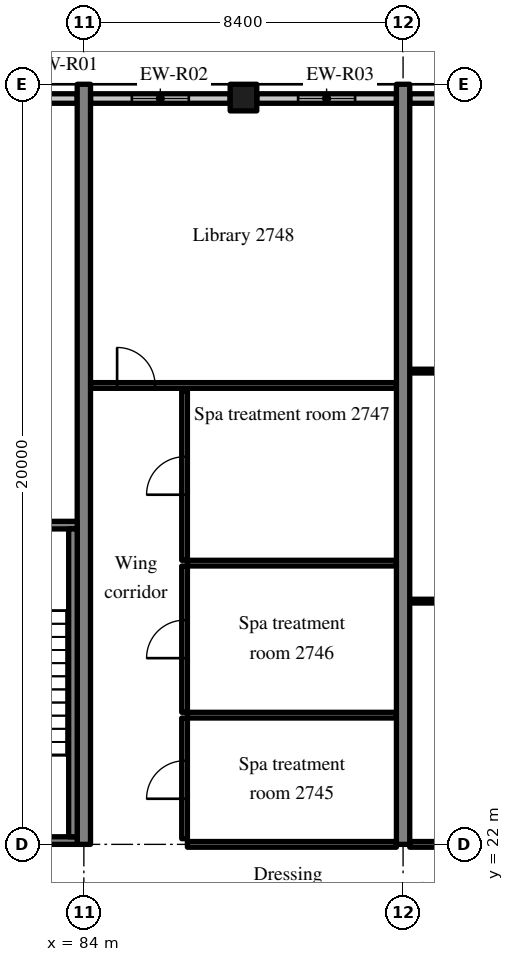
"""IFC4 building model, lengths in metres.
Left out: names, types, materials, properties, quantities, classifications, styles, units other than length and angle.
Written with IfcOpenShell. Run it as: python <this file> out.ifc"""

import sys

from ifc_helpers import new_model, si_unit, direction, frame, frame_2d, origin, origin_2d, place, context, subcontext, project, spatial, rectangle, extrude, source, transform, mapped, element, fill, save


model = new_model("IFC4")
c1 = context("Model", 3, precision=1e-05, world=origin(), true_north=direction((0.0, 1.0)))
c2 = subcontext(c1, "Body", "Model", "MODEL_VIEW")
j1 = project(units=[si_unit("LENGTHUNIT", "METRE"), si_unit("PLANEANGLEUNIT", "RADIAN")], contexts=[c1])
p1 = place(None, origin())
s1 = spatial("IfcSite", under=j1, at=p1, CompositionType="ELEMENT")
p2 = place(p1, origin())
s2 = spatial("IfcBuilding", under=s1, at=p2, CompositionType="ELEMENT")
p3 = place(p2, frame((0.0, 0.0, 114.2)))
s3 = spatial("IfcBuildingStorey", under=s2, at=p3, CompositionType="ELEMENT", Elevation=114.2)
m1 = source(origin(), c2, "Body", "SweptSolid", [
    extrude(rectangle(XDim=20.0, YDim=0.35, at=frame_2d((10.0, 0.0))), origin(), (0.0, 0.0, 1.0), 3.52),
])
for number, where, z_axis, x_axis in (
    (1, (84.0, 22.0, 0.0), (0.0, 0.0, 1.0), (0.0, 1.0, 0.0)),
    (2, (92.4, 22.0, 0.0), (0.0, 0.0, 1.0), (0.0, 1.0, 0.0)),
):
    element("IfcWall", number, at=place(p3, frame(where, z_axis=z_axis, x_axis=x_axis)), inside=s3, PredefinedType="SHEAR", context=c2, shape_type="MappedRepresentation", body=[
        mapped(m1, transform((0.0, 0.0, 0.0), scale=1.0)),
    ])
m2 = source(origin(), c2, "Body", "SweptSolid", [
    extrude(rectangle(XDim=0.7, YDim=0.7, at=origin_2d()), origin(), (0.0, 0.0, 1.0), 3.52),
])
p4 = place(p3, frame((88.2, 41.65, 0.0), z_axis=(0.0, 0.0, 1.0), x_axis=(1.0, 0.0, 0.0)))
e3 = element("IfcColumn", 3, at=p4, inside=s3, PredefinedType="COLUMN", context=c2, shape_type="MappedRepresentation", body=[
    mapped(m2, transform((0.0, 0.0, 0.0), scale=1.0)),
])
m3 = source(origin(), c2, "Body", "SweptSolid", [
    extrude(rectangle(XDim=1.683, YDim=0.25, at=frame_2d((0.841, 0.0))), origin(), (0.0, 0.0, 1.0), 2.82),
])
p5 = place(p3, frame((83.825, 41.625, 0.0), z_axis=(0.0, 0.0, 1.0), x_axis=(-1.0, 0.0, 0.0)))
e4 = element("IfcWall", 4, at=p5, inside=s3, PredefinedType="SOLIDWALL", context=c2, shape_type="MappedRepresentation", body=[
    mapped(m3, transform((0.0, 0.0, 0.0), scale=1.0)),
])
m4 = source(origin(), c2, "Body", "SweptSolid", [
    extrude(rectangle(XDim=3.675, YDim=0.25, at=frame_2d((1.837, 0.0))), origin(), (0.0, 0.0, 1.0), 2.82),
])
p6 = place(p3, frame((87.85, 41.625, 0.0), z_axis=(0.0, 0.0, 1.0), x_axis=(-1.0, 0.0, 0.0)))
e5 = element("IfcWall", 5, at=p6, inside=s3, PredefinedType="SOLIDWALL", context=c2, shape_type="MappedRepresentation", body=[
    mapped(m4, transform((0.0, 0.0, 0.0), scale=1.0)),
])
m5 = source(origin(), c2, "Body", "SweptSolid", [
    extrude(rectangle(XDim=1.5, YDim=1.5, at=frame_2d((0.75, 0.75))), frame((0.0, 0.135, 0.0), z_axis=(0.0, -1.0, 0.0), x_axis=(1.0, 0.0, 0.0)), (0.0, 0.0, 1.0), 0.27),
])
p7 = place(p6, frame((1.087, 0.0, 0.9)))
e6 = element("IfcOpeningElement", 6, at=p7, cuts=e5, PredefinedType="OPENING", context=c2, shape_type="MappedRepresentation", body=[
    mapped(m5, transform((0.0, 0.0, 0.0), scale=1.0)),
])
p8 = place(p3, frame((92.225, 41.625, 0.0), z_axis=(0.0, 0.0, 1.0), x_axis=(-1.0, 0.0, 0.0)))
e7 = element("IfcWall", 7, at=p8, inside=s3, PredefinedType="SOLIDWALL", context=c2, shape_type="MappedRepresentation", body=[
    mapped(m4, transform((0.0, 0.0, 0.0), scale=1.0)),
])
p9 = place(p8, frame((1.087, 0.0, 0.9)))
e8 = element("IfcOpeningElement", 8, at=p9, cuts=e7, PredefinedType="OPENING", context=c2, shape_type="MappedRepresentation", body=[
    mapped(m5, transform((0.0, 0.0, 0.0), scale=1.0)),
])
m6 = source(origin(), c2, "Body", "SweptSolid", [
    extrude(rectangle(XDim=4.07, YDim=0.25, at=frame_2d((2.035, 0.0))), origin(), (0.0, 0.0, 1.0), 2.82),
])
p10 = place(p3, frame((96.645, 41.625, 0.0), z_axis=(0.0, 0.0, 1.0), x_axis=(-1.0, 0.0, 0.0)))
e9 = element("IfcWall", 9, at=p10, inside=s3, PredefinedType="SOLIDWALL", context=c2, shape_type="MappedRepresentation", body=[
    mapped(m6, transform((0.0, 0.0, 0.0), scale=1.0)),
])
p11 = place(p10, frame((1.285, 0.0, 0.9)))
e10 = element("IfcOpeningElement", 10, at=p11, cuts=e9, PredefinedType="OPENING", context=c2, shape_type="MappedRepresentation", body=[
    mapped(m5, transform((0.0, 0.0, 0.0), scale=1.0)),
])
m7 = source(origin(), c2, "Body", "SweptSolid", [
    extrude(rectangle(XDim=8.225, YDim=0.2, at=frame_2d((4.112, 0.0))), origin(), (0.0, 0.0, 1.0), 3.52),
])
p12 = place(p3, frame((83.825, 22.1, 0.0), z_axis=(0.0, 0.0, 1.0), x_axis=(-1.0, 0.0, 0.0)))
e11 = element("IfcWall", 11, at=p12, inside=s3, PredefinedType="SOLIDWALL", context=c2, shape_type="MappedRepresentation", body=[
    mapped(m7, transform((0.0, 0.0, 0.0), scale=1.0)),
])
m8 = source(origin(), c2, "Body", "SweptSolid", [
    extrude(rectangle(XDim=1.2, YDim=2.1, at=frame_2d((0.6, 1.05))), frame((0.0, 0.11, 0.0), z_axis=(0.0, -1.0, 0.0), x_axis=(1.0, 0.0, 0.0)), (0.0, 0.0, 1.0), 0.22),
])
p13 = place(p12, frame((6.025, 0.0, 0.0)))
e12 = element("IfcOpeningElement", 12, at=p13, cuts=e11, PredefinedType="OPENING", context=c2, shape_type="MappedRepresentation", body=[
    mapped(m8, transform((0.0, 0.0, 0.0), scale=1.0)),
])
p14 = place(p3, frame((83.825, 30.4, 0.0), z_axis=(0.0, 0.0, 1.0), x_axis=(-1.0, 0.0, 0.0)))
e13 = element("IfcWall", 13, at=p14, inside=s3, PredefinedType="SOLIDWALL", context=c2, shape_type="MappedRepresentation", body=[
    mapped(m7, transform((0.0, 0.0, 0.0), scale=1.0)),
])
m9 = source(origin(), c2, "Body", "SweptSolid", [
    extrude(rectangle(XDim=1.0, YDim=2.1, at=frame_2d((0.5, 1.05))), frame((0.0, 0.11, 0.0), z_axis=(0.0, -1.0, 0.0), x_axis=(1.0, 0.0, 0.0)), (0.0, 0.0, 1.0), 0.22),
])
p15 = place(p14, frame((6.125, 0.0, 0.0)))
e14 = element("IfcOpeningElement", 14, at=p15, cuts=e13, PredefinedType="OPENING", context=c2, shape_type="MappedRepresentation", body=[
    mapped(m9, transform((0.0, 0.0, 0.0), scale=1.0)),
])
m10 = source(origin(), c2, "Body", "SweptSolid", [
    extrude(rectangle(XDim=8.1, YDim=0.225, at=frame_2d((4.05, 0.0))), origin(), (0.0, 0.0, 1.0), 3.52),
])
p16 = place(p3, frame((83.713, 22.2, 0.0), z_axis=(0.0, 0.0, 1.0), x_axis=(0.0, 1.0, 0.0)))
e15 = element("IfcWall", 15, at=p16, inside=s3, PredefinedType="SOLIDWALL", context=c2, shape_type="MappedRepresentation", body=[
    mapped(m10, transform((0.0, 0.0, 0.0), scale=1.0)),
])
m11 = source(origin(), c2, "Body", "SweptSolid", [
    extrude(rectangle(XDim=5.5, YDim=0.15, at=frame_2d((2.75, 0.0))), origin(), (0.0, 0.0, 1.0), 2.82),
])
p17 = place(p3, frame((86.725, 22.0, 0.0), z_axis=(0.0, 0.0, 1.0), x_axis=(1.0, 0.0, 0.0)))
e16 = element("IfcWall", 16, at=p17, inside=s3, PredefinedType="PARTITIONING", context=c2, shape_type="MappedRepresentation", body=[
    mapped(m11, transform((0.0, 0.0, 0.0), scale=1.0)),
])
m12 = source(origin(), c2, "Body", "SweptSolid", [
    extrude(rectangle(XDim=3.175, YDim=0.15, at=frame_2d((1.587, 0.0))), origin(), (0.0, 0.0, 1.0), 3.52),
])
p18 = place(p3, frame((86.65, 22.15, 0.0), z_axis=(0.0, 0.0, 1.0), x_axis=(0.0, 1.0, 0.0)))
e17 = element("IfcWall", 17, at=p18, inside=s3, PredefinedType="PARTITIONING", context=c2, shape_type="MappedRepresentation", body=[
    mapped(m12, transform((0.0, 0.0, 0.0), scale=1.0)),
])
m13 = source(origin(), c2, "Body", "SweptSolid", [
    extrude(rectangle(XDim=1.0, YDim=2.1, at=frame_2d((0.5, 1.05))), frame((0.0, 0.085, 0.0), z_axis=(0.0, -1.0, 0.0), x_axis=(1.0, 0.0, 0.0)), (0.0, 0.0, 1.0), 0.17),
])
p19 = place(p18, frame((1.05, 0.0, 0.0)))
e18 = element("IfcOpeningElement", 18, at=p19, cuts=e17, PredefinedType="OPENING", context=c2, shape_type="MappedRepresentation", body=[
    mapped(m13, transform((0.0, 0.0, 0.0), scale=1.0)),
])
m14 = source(origin(), c2, "Body", "SweptSolid", [
    extrude(rectangle(XDim=5.5, YDim=0.15, at=frame_2d((2.75, 0.0))), origin(), (0.0, 0.0, 1.0), 3.52),
])
p20 = place(p3, frame((86.725, 25.4, 0.0), z_axis=(0.0, 0.0, 1.0), x_axis=(1.0, 0.0, 0.0)))
e19 = element("IfcWall", 19, at=p20, inside=s3, PredefinedType="PARTITIONING", context=c2, shape_type="MappedRepresentation", body=[
    mapped(m14, transform((0.0, 0.0, 0.0), scale=1.0)),
])
m15 = source(origin(), c2, "Body", "SweptSolid", [
    extrude(rectangle(XDim=3.85, YDim=0.15, at=frame_2d((1.925, 0.0))), origin(), (0.0, 0.0, 1.0), 3.52),
])
p21 = place(p3, frame((86.65, 25.475, 0.0), z_axis=(0.0, 0.0, 1.0), x_axis=(0.0, 1.0, 0.0)))
e20 = element("IfcWall", 20, at=p21, inside=s3, PredefinedType="PARTITIONING", context=c2, shape_type="MappedRepresentation", body=[
    mapped(m15, transform((0.0, 0.0, 0.0), scale=1.0)),
])
p22 = place(p21, frame((1.425, 0.0, 0.0)))
e21 = element("IfcOpeningElement", 21, at=p22, cuts=e20, PredefinedType="OPENING", context=c2, shape_type="MappedRepresentation", body=[
    mapped(m13, transform((0.0, 0.0, 0.0), scale=1.0)),
])
p23 = place(p3, frame((86.725, 29.4, 0.0), z_axis=(0.0, 0.0, 1.0), x_axis=(1.0, 0.0, 0.0)))
e22 = element("IfcWall", 22, at=p23, inside=s3, PredefinedType="PARTITIONING", context=c2, shape_type="MappedRepresentation", body=[
    mapped(m14, transform((0.0, 0.0, 0.0), scale=1.0)),
])
m16 = source(origin(), c2, "Body", "SweptSolid", [
    extrude(rectangle(XDim=4.45, YDim=0.15, at=frame_2d((2.225, 0.0))), origin(), (0.0, 0.0, 1.0), 3.52),
])
p24 = place(p3, frame((86.65, 29.475, 0.0), z_axis=(0.0, 0.0, 1.0), x_axis=(0.0, 1.0, 0.0)))
e23 = element("IfcWall", 23, at=p24, inside=s3, PredefinedType="PARTITIONING", context=c2, shape_type="MappedRepresentation", body=[
    mapped(m16, transform((0.0, 0.0, 0.0), scale=1.0)),
])
p25 = place(p24, frame((1.725, 0.0, 0.0)))
e24 = element("IfcOpeningElement", 24, at=p25, cuts=e23, PredefinedType="OPENING", context=c2, shape_type="MappedRepresentation", body=[
    mapped(m13, transform((0.0, 0.0, 0.0), scale=1.0)),
])
m17 = source(origin(), c2, "Body", "SweptSolid", [
    extrude(rectangle(XDim=8.05, YDim=0.15, at=frame_2d((4.025, 0.0))), origin(), (0.0, 0.0, 1.0), 3.52),
])
p26 = place(p3, frame((84.175, 34.075, 0.0), z_axis=(0.0, 0.0, 1.0), x_axis=(1.0, 0.0, 0.0)))
e25 = element("IfcWall", 25, at=p26, inside=s3, PredefinedType="PARTITIONING", context=c2, shape_type="MappedRepresentation", body=[
    mapped(m17, transform((0.0, 0.0, 0.0), scale=1.0)),
])
p27 = place(p26, frame((0.7, 0.0, 0.0)))
e26 = element("IfcOpeningElement", 26, at=p27, cuts=e25, PredefinedType="OPENING", context=c2, shape_type="MappedRepresentation", body=[
    mapped(m13, transform((0.0, 0.0, 0.0), scale=1.0)),
])
m18 = source(origin(), c2, "Body", "SweptSolid", [
    extrude(rectangle(XDim=2.425, YDim=0.1, at=frame_2d((1.212, 0.0))), origin(), (0.0, 0.0, 1.0), 3.52),
])
p28 = place(p3, frame((92.575, 28.4, 0.0), z_axis=(0.0, 0.0, 1.0), x_axis=(1.0, 0.0, 0.0)))
e27 = element("IfcWall", 27, at=p28, inside=s3, PredefinedType="PARTITIONING", context=c2, shape_type="MappedRepresentation", body=[
    mapped(m18, transform((0.0, 0.0, 0.0), scale=1.0)),
])
m19 = source(origin(), c2, "Body", "SweptSolid", [
    extrude(rectangle(XDim=0.9, YDim=2.1, at=frame_2d((0.45, 1.05))), frame((0.0, 0.06, 0.0), z_axis=(0.0, -1.0, 0.0), x_axis=(1.0, 0.0, 0.0)), (0.0, 0.0, 1.0), 0.12),
])
p29 = place(p28, frame((0.763, 0.0, 0.0)))
e28 = element("IfcOpeningElement", 28, at=p29, cuts=e27, PredefinedType="OPENING", context=c2, shape_type="MappedRepresentation", body=[
    mapped(m19, transform((0.0, 0.0, 0.0), scale=1.0)),
])
m20 = source(origin(), c2, "Body", "SweptSolid", [
    extrude(rectangle(XDim=7.875, YDim=0.1, at=frame_2d((3.938, 0.0))), origin(), (0.0, 0.0, 1.0), 3.52),
])
p30 = place(p3, frame((92.575, 34.453, 0.0), z_axis=(0.0, 0.0, 1.0), x_axis=(1.0, 0.0, 0.0)))
e29 = element("IfcWall", 29, at=p30, inside=s3, PredefinedType="PARTITIONING", context=c2, shape_type="MappedRepresentation", body=[
    mapped(m20, transform((0.0, 0.0, 0.0), scale=1.0)),
])
m21 = source(origin(), c2, "Body", "SweptSolid", [
    extrude(rectangle(XDim=1.8, YDim=2.1, at=frame_2d((0.9, 1.05))), frame((0.0, 0.06, 0.0), z_axis=(0.0, -1.0, 0.0), x_axis=(1.0, 0.0, 0.0)), (0.0, 0.0, 1.0), 0.12),
])
p31 = place(p30, frame((3.037, 0.0, 0.0)))
e30 = element("IfcOpeningElement", 30, at=p31, cuts=e29, PredefinedType="OPENING", context=c2, shape_type="MappedRepresentation", body=[
    mapped(m21, transform((0.0, 0.0, 0.0), scale=1.0)),
])
m22 = source(origin(), c2, "Body", "SweptSolid", [
    extrude(rectangle(XDim=7.875, YDim=0.15, at=frame_2d((3.938, 0.0))), origin(), (0.0, 0.0, 1.0), 2.82),
])
p32 = place(p3, frame((92.575, 22.0, 0.0), z_axis=(0.0, 0.0, 1.0), x_axis=(1.0, 0.0, 0.0)))
e31 = element("IfcWall", 31, at=p32, inside=s3, PredefinedType="PARTITIONING", context=c2, shape_type="MappedRepresentation", body=[
    mapped(m22, transform((0.0, 0.0, 0.0), scale=1.0)),
])
p33 = place(p32, frame((6.475, 0.0, 0.0)))
e32 = element("IfcOpeningElement", 32, at=p33, cuts=e31, PredefinedType="OPENING", context=c2, shape_type="MappedRepresentation", body=[
    mapped(m13, transform((0.0, 0.0, 0.0), scale=1.0)),
])
m23 = source(origin(), c2, "Body", "SweptSolid", [
    extrude(rectangle(XDim=1.5, YDim=1.5, at=frame_2d((0.75, 0.75))), frame((0.0, 0.03, 0.0), z_axis=(0.0, -1.0, 0.0), x_axis=(1.0, 0.0, 0.0)), (0.0, 0.0, 1.0), 0.06),
])
p34 = place(p7, origin())
e33 = element("IfcWindow", 33, at=p34, inside=s3, PartitioningType="SINGLE_PANEL", PredefinedType="WINDOW", context=c2, shape_type="MappedRepresentation", body=[
    mapped(m23, transform((0.0, 0.0, 0.0), scale=1.0)),
])
fill(e6, e33)
p35 = place(p9, origin())
e34 = element("IfcWindow", 34, at=p35, inside=s3, PartitioningType="SINGLE_PANEL", PredefinedType="WINDOW", context=c2, shape_type="MappedRepresentation", body=[
    mapped(m23, transform((0.0, 0.0, 0.0), scale=1.0)),
])
fill(e8, e34)
m24 = source(origin(), c2, "Body", "SweptSolid", [
    extrude(rectangle(XDim=1.0, YDim=2.1, at=frame_2d((0.5, 1.05))), frame((0.0, 0.025, 0.0), z_axis=(0.0, -1.0, 0.0), x_axis=(1.0, 0.0, 0.0)), (0.0, 0.0, 1.0), 0.05),
])
p36 = place(p19, origin())
e35 = element("IfcDoor", 35, at=p36, inside=s3, OperationType="SINGLE_SWING_LEFT", PredefinedType="DOOR", context=c2, shape_type="MappedRepresentation", body=[
    mapped(m24, transform((0.0, 0.0, 0.0), scale=1.0)),
])
fill(e18, e35)
p37 = place(p22, origin())
e36 = element("IfcDoor", 36, at=p37, inside=s3, OperationType="SINGLE_SWING_LEFT", PredefinedType="DOOR", context=c2, shape_type="MappedRepresentation", body=[
    mapped(m24, transform((0.0, 0.0, 0.0), scale=1.0)),
])
fill(e21, e36)
p38 = place(p25, origin())
e37 = element("IfcDoor", 37, at=p38, inside=s3, OperationType="SINGLE_SWING_LEFT", PredefinedType="DOOR", context=c2, shape_type="MappedRepresentation", body=[
    mapped(m24, transform((0.0, 0.0, 0.0), scale=1.0)),
])
fill(e24, e37)
p39 = place(p27, origin())
e38 = element("IfcDoor", 38, at=p39, inside=s3, OperationType="SINGLE_SWING_LEFT", PredefinedType="DOOR", context=c2, shape_type="MappedRepresentation", body=[
    mapped(m24, transform((0.0, 0.0, 0.0), scale=1.0)),
])
fill(e26, e38)
save(model, sys.argv[1])
